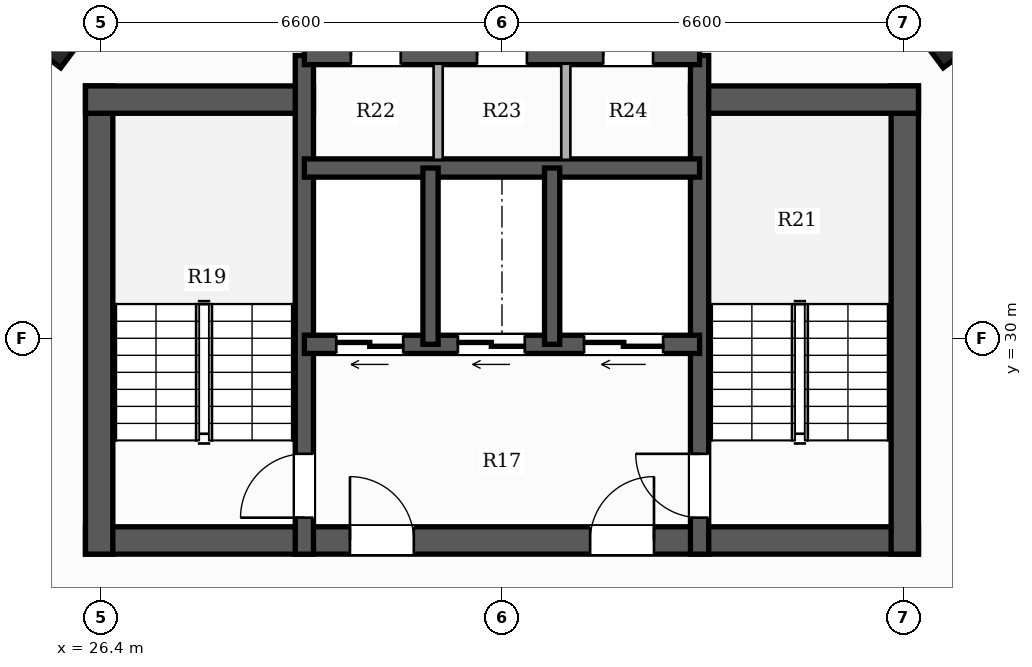
"""IFC4 building model, lengths in metres.
Left out: names, types, materials, properties, quantities, classifications, styles, units other than length and angle.
Written with IfcOpenShell. Run it as: python <this file> out.ifc"""

import sys

from ifc_helpers import new_model, si_unit, direction, frame, frame_2d, origin, origin_2d, place, context, subcontext, project, spatial, rectangle, hollow_rectangle, extrude, element, fill, save


model = new_model("IFC4")
c1 = context("Model", 3, precision=1e-05, world=origin(), true_north=direction((0.0, 1.0)))
c2 = subcontext(c1, "Body", "Model", "MODEL_VIEW")
j1 = project(units=[si_unit("LENGTHUNIT", "METRE"), si_unit("PLANEANGLEUNIT", "RADIAN")], contexts=[c1])
p1 = place(None, origin())
s1 = spatial("IfcSite", under=j1, at=p1, CompositionType="ELEMENT")
p2 = place(p1, origin())
s2 = spatial("IfcBuilding", under=s1, at=p2, CompositionType="ELEMENT")
p3 = place(p2, frame((0.0, 0.0, 67.55)))
s3 = spatial("IfcBuildingStorey", under=s2, at=p3, CompositionType="ELEMENT", Elevation=67.55)
p4 = place(p3, frame((26.15, 26.675, 0.0), z_axis=(0.0, 0.0, 1.0), x_axis=(1.0, 0.0, 0.0)))
e1 = element("IfcWall", 1, at=p4, inside=s3, PredefinedType="SHEAR", context=c2, shape_type="SweptSolid", body=[
    extrude(rectangle(XDim=13.7, YDim=0.45, at=frame_2d((6.85, 0.0))), origin(), (0.0, 0.0, 1.0), 3.3),
])
p5 = place(p4, frame((4.35, 0.0, 0.0)))
e2 = element("IfcOpeningElement", 2, at=p5, cuts=e1, PredefinedType="OPENING", context=c2, shape_type="SweptSolid", body=[
    extrude(rectangle(XDim=1.05, YDim=2.15, at=frame_2d((0.525, 1.075))), frame((0.0, 0.235, 0.0), z_axis=(0.0, -1.0, 0.0), x_axis=(1.0, 0.0, 0.0)), (0.0, 0.0, 1.0), 0.47),
])
p6 = place(p4, frame((8.3, 0.0, 0.0)))
e3 = element("IfcOpeningElement", 3, at=p6, cuts=e1, PredefinedType="OPENING", context=c2, shape_type="SweptSolid", body=[
    extrude(rectangle(XDim=1.05, YDim=2.15, at=frame_2d((0.525, 1.075))), frame((0.0, 0.235, 0.0), z_axis=(0.0, -1.0, 0.0), x_axis=(1.0, 0.0, 0.0)), (0.0, 0.0, 1.0), 0.47),
])
p7 = place(p3, frame((26.375, 26.45, 0.0), z_axis=(0.0, 0.0, 1.0), x_axis=(0.0, 1.0, 0.0)))
e4 = element("IfcWall", 4, at=p7, inside=s3, PredefinedType="SHEAR", context=c2, shape_type="SweptSolid", body=[
    extrude(rectangle(XDim=7.7, YDim=0.45, at=frame_2d((3.85, 0.0))), origin(), (0.0, 0.0, 1.0), 3.3),
])
p8 = place(p3, frame((26.15, 33.925, 0.0), z_axis=(0.0, 0.0, 1.0), x_axis=(1.0, 0.0, 0.0)))
e5 = element("IfcWall", 5, at=p8, inside=s3, PredefinedType="SHEAR", context=c2, shape_type="SweptSolid", body=[
    extrude(rectangle(XDim=3.75, YDim=0.45, at=frame_2d((1.875, 0.0))), origin(), (0.0, 0.0, 1.0), 3.3),
])
p9 = place(p3, frame((39.625, 26.45, 0.0), z_axis=(0.0, 0.0, 1.0), x_axis=(0.0, 1.0, 0.0)))
e6 = element("IfcWall", 6, at=p9, inside=s3, PredefinedType="SHEAR", context=c2, shape_type="SweptSolid", body=[
    extrude(rectangle(XDim=7.7, YDim=0.45, at=frame_2d((3.85, 0.0))), origin(), (0.0, 0.0, 1.0), 3.3),
])
p10 = place(p3, frame((36.1, 33.925, 0.0), z_axis=(0.0, 0.0, 1.0), x_axis=(1.0, 0.0, 0.0)))
e7 = element("IfcWall", 7, at=p10, inside=s3, PredefinedType="SHEAR", context=c2, shape_type="SweptSolid", body=[
    extrude(rectangle(XDim=3.75, YDim=0.45, at=frame_2d((1.875, 0.0))), origin(), (0.0, 0.0, 1.0), 3.3),
])
p11 = place(p3, frame((29.75, 26.45, 0.0), z_axis=(0.0, 0.0, 1.0), x_axis=(0.0, 1.0, 0.0)))
e8 = element("IfcWall", 8, at=p11, inside=s3, PredefinedType="SHEAR", context=c2, shape_type="SweptSolid", body=[
    extrude(rectangle(XDim=8.2, YDim=0.3, at=frame_2d((4.1, 0.0))), origin(), (0.0, 0.0, 1.0), 3.3),
])
p12 = place(p11, frame((0.6, 0.0, 0.0)))
e9 = element("IfcOpeningElement", 9, at=p12, cuts=e8, PredefinedType="OPENING", context=c2, shape_type="SweptSolid", body=[
    extrude(rectangle(XDim=1.05, YDim=2.15, at=frame_2d((0.525, 1.075))), frame((0.0, 0.16, 0.0), z_axis=(0.0, -1.0, 0.0), x_axis=(1.0, 0.0, 0.0)), (0.0, 0.0, 1.0), 0.32),
])
p13 = place(p3, frame((36.25, 26.45, 0.0), z_axis=(0.0, 0.0, 1.0), x_axis=(0.0, 1.0, 0.0)))
e10 = element("IfcWall", 10, at=p13, inside=s3, PredefinedType="SHEAR", context=c2, shape_type="SweptSolid", body=[
    extrude(rectangle(XDim=8.2, YDim=0.3, at=frame_2d((4.1, 0.0))), origin(), (0.0, 0.0, 1.0), 3.3),
])
p14 = place(p13, frame((0.6, 0.0, 0.0)))
e11 = element("IfcOpeningElement", 11, at=p14, cuts=e10, PredefinedType="OPENING", context=c2, shape_type="SweptSolid", body=[
    extrude(rectangle(XDim=1.05, YDim=2.15, at=frame_2d((0.525, 1.075))), frame((0.0, 0.16, 0.0), z_axis=(0.0, -1.0, 0.0), x_axis=(1.0, 0.0, 0.0)), (0.0, 0.0, 1.0), 0.32),
])
p15 = place(p3, frame((36.25, 29.9, 0.0), z_axis=(0.0, 0.0, 1.0), x_axis=(-1.0, 0.0, 0.0)))
e12 = element("IfcWall", 12, at=p15, inside=s3, PredefinedType="SHEAR", context=c2, shape_type="SweptSolid", body=[
    extrude(rectangle(XDim=6.5, YDim=0.3, at=frame_2d((3.25, 0.0))), origin(), (0.0, 0.0, 1.0), 3.3),
])
p16 = place(p15, frame((4.875, 0.0, 0.0)))
e13 = element("IfcOpeningElement", 13, at=p16, cuts=e12, PredefinedType="OPENING", context=c2, shape_type="SweptSolid", body=[
    extrude(rectangle(XDim=1.1, YDim=2.2, at=frame_2d((0.55, 1.1))), frame((0.0, 0.16, 0.0), z_axis=(0.0, -1.0, 0.0), x_axis=(1.0, 0.0, 0.0)), (0.0, 0.0, 1.0), 0.32),
])
p17 = place(p15, frame((2.875, 0.0, 0.0)))
e14 = element("IfcOpeningElement", 14, at=p17, cuts=e12, PredefinedType="OPENING", context=c2, shape_type="SweptSolid", body=[
    extrude(rectangle(XDim=1.1, YDim=2.2, at=frame_2d((0.55, 1.1))), frame((0.0, 0.16, 0.0), z_axis=(0.0, -1.0, 0.0), x_axis=(1.0, 0.0, 0.0)), (0.0, 0.0, 1.0), 0.32),
])
p18 = place(p15, frame((0.6, 0.0, 0.0)))
e15 = element("IfcOpeningElement", 15, at=p18, cuts=e12, PredefinedType="OPENING", context=c2, shape_type="SweptSolid", body=[
    extrude(rectangle(XDim=1.3, YDim=2.2, at=frame_2d((0.65, 1.1))), frame((0.0, 0.16, 0.0), z_axis=(0.0, -1.0, 0.0), x_axis=(1.0, 0.0, 0.0)), (0.0, 0.0, 1.0), 0.32),
])
p19 = place(p3, frame((29.75, 32.8, 0.0), z_axis=(0.0, 0.0, 1.0), x_axis=(1.0, 0.0, 0.0)))
e16 = element("IfcWall", 16, at=p19, inside=s3, PredefinedType="SHEAR", context=c2, shape_type="SweptSolid", body=[
    extrude(rectangle(XDim=6.5, YDim=0.3, at=frame_2d((3.25, 0.0))), origin(), (0.0, 0.0, 1.0), 3.3),
])
for number, where, z_axis, x_axis in (
    (17, (31.825, 29.9, 0.0), (0.0, 0.0, 1.0), (0.0, 1.0, 0.0)),
    (18, (33.825, 29.9, 0.0), (0.0, 0.0, 1.0), (0.0, 1.0, 0.0)),
):
    element("IfcWall", number, at=place(p3, frame(where, z_axis=z_axis, x_axis=x_axis)), inside=s3, PredefinedType="SHEAR", context=c2, shape_type="SweptSolid", body=[
        extrude(rectangle(XDim=2.9, YDim=0.25, at=frame_2d((1.45, 0.0))), origin(), (0.0, 0.0, 1.0), 3.3),
    ])
p20 = place(p3, frame((29.75, 34.65, 0.0), z_axis=(0.0, 0.0, 1.0), x_axis=(1.0, 0.0, 0.0)))
e19 = element("IfcWall", 19, at=p20, inside=s3, PredefinedType="SHEAR", context=c2, shape_type="SweptSolid", body=[
    extrude(rectangle(XDim=6.5, YDim=0.3, at=frame_2d((3.25, 0.0))), origin(), (0.0, 0.0, 1.0), 3.3),
])
p21 = place(p20, frame((0.765, 0.0, 0.0)))
e20 = element("IfcOpeningElement", 20, at=p21, cuts=e19, PredefinedType="OPENING", context=c2, shape_type="SweptSolid", body=[
    extrude(rectangle(XDim=0.82, YDim=2.1, at=frame_2d((0.41, 1.05))), frame((0.0, 0.16, 0.0), z_axis=(0.0, -1.0, 0.0), x_axis=(1.0, 0.0, 0.0)), (0.0, 0.0, 1.0), 0.32),
])
p22 = place(p20, frame((2.84, 0.0, 0.0)))
e21 = element("IfcOpeningElement", 21, at=p22, cuts=e19, PredefinedType="OPENING", context=c2, shape_type="SweptSolid", body=[
    extrude(rectangle(XDim=0.82, YDim=2.1, at=frame_2d((0.41, 1.05))), frame((0.0, 0.16, 0.0), z_axis=(0.0, -1.0, 0.0), x_axis=(1.0, 0.0, 0.0)), (0.0, 0.0, 1.0), 0.32),
])
p23 = place(p20, frame((4.915, 0.0, 0.0)))
e22 = element("IfcOpeningElement", 22, at=p23, cuts=e19, PredefinedType="OPENING", context=c2, shape_type="SweptSolid", body=[
    extrude(rectangle(XDim=0.82, YDim=2.1, at=frame_2d((0.41, 1.05))), frame((0.0, 0.16, 0.0), z_axis=(0.0, -1.0, 0.0), x_axis=(1.0, 0.0, 0.0)), (0.0, 0.0, 1.0), 0.32),
])
for number, where, z_axis, x_axis in (
    (23, (25.648, 35.113, 0.0), (0.0, 0.0, 1.0), (0.6, 0.8, 0.0)),
    (24, (40.352, 35.113, 0.0), (0.0, 0.0, 1.0), (-0.6, 0.8, 0.0)),
):
    element("IfcColumn", number, at=place(p3, frame(where, z_axis=z_axis, x_axis=x_axis)), inside=s3, PredefinedType="COLUMN", context=c2, shape_type="SweptSolid", body=[
        extrude(hollow_rectangle(XDim=0.95, YDim=0.95, WallThickness=0.032, at=origin_2d()), origin(), (0.0, 0.0, 1.0), 3.3),
    ])
for number, where, z_axis, x_axis in (
    (25, (31.95, 32.935, 0.0), (0.0, 0.0, 1.0), (0.0, 1.0, 0.0)),
    (26, (34.05, 32.935, 0.0), (0.0, 0.0, 1.0), (0.0, 1.0, 0.0)),
):
    element("IfcWall", number, at=place(p3, frame(where, z_axis=z_axis, x_axis=x_axis)), inside=s3, PredefinedType="PARTITIONING", context=c2, shape_type="SweptSolid", body=[
        extrude(rectangle(XDim=1.58, YDim=0.15, at=frame_2d((0.79, 0.0))), origin(), (0.0, 0.0, 1.0), 3.06),
    ])
p24 = place(p12, origin())
e27 = element("IfcDoor", 27, at=p24, inside=s3, OperationType="SINGLE_SWING_LEFT", PredefinedType="DOOR", context=c2, shape_type="SweptSolid", body=[
    extrude(rectangle(XDim=1.05, YDim=2.15, at=frame_2d((0.525, 1.075))), frame((0.0, 0.025, 0.0), z_axis=(0.0, -1.0, 0.0), x_axis=(1.0, 0.0, 0.0)), (0.0, 0.0, 1.0), 0.05),
])
fill(e9, e27)
p25 = place(p14, origin())
e28 = element("IfcDoor", 28, at=p25, inside=s3, OperationType="SINGLE_SWING_RIGHT", PredefinedType="DOOR", context=c2, shape_type="SweptSolid", body=[
    extrude(rectangle(XDim=1.05, YDim=2.15, at=frame_2d((0.525, 1.075))), frame((0.0, 0.025, 0.0), z_axis=(0.0, -1.0, 0.0), x_axis=(1.0, 0.0, 0.0)), (0.0, 0.0, 1.0), 0.05),
])
fill(e11, e28)
p26 = place(p5, origin())
e29 = element("IfcDoor", 29, at=p26, inside=s3, OperationType="SINGLE_SWING_LEFT", PredefinedType="DOOR", context=c2, shape_type="SweptSolid", body=[
    extrude(rectangle(XDim=1.05, YDim=2.15, at=frame_2d((0.525, 1.075))), frame((0.0, 0.025, 0.0), z_axis=(0.0, -1.0, 0.0), x_axis=(1.0, 0.0, 0.0)), (0.0, 0.0, 1.0), 0.05),
])
fill(e2, e29)
p27 = place(p6, origin())
e30 = element("IfcDoor", 30, at=p27, inside=s3, OperationType="SINGLE_SWING_RIGHT", PredefinedType="DOOR", context=c2, shape_type="SweptSolid", body=[
    extrude(rectangle(XDim=1.05, YDim=2.15, at=frame_2d((0.525, 1.075))), frame((0.0, 0.025, 0.0), z_axis=(0.0, -1.0, 0.0), x_axis=(1.0, 0.0, 0.0)), (0.0, 0.0, 1.0), 0.05),
])
fill(e3, e30)
p28 = place(p16, origin())
e31 = element("IfcDoor", 31, at=p28, inside=s3, OperationType="DOUBLE_DOOR_SLIDING", PredefinedType="DOOR", context=c2, shape_type="SweptSolid", body=[
    extrude(rectangle(XDim=1.1, YDim=2.2, at=frame_2d((0.55, 1.1))), frame((0.0, 0.025, 0.0), z_axis=(0.0, -1.0, 0.0), x_axis=(1.0, 0.0, 0.0)), (0.0, 0.0, 1.0), 0.05),
])
fill(e13, e31)
p29 = place(p17, origin())
e32 = element("IfcDoor", 32, at=p29, inside=s3, OperationType="DOUBLE_DOOR_SLIDING", PredefinedType="DOOR", context=c2, shape_type="SweptSolid", body=[
    extrude(rectangle(XDim=1.1, YDim=2.2, at=frame_2d((0.55, 1.1))), frame((0.0, 0.025, 0.0), z_axis=(0.0, -1.0, 0.0), x_axis=(1.0, 0.0, 0.0)), (0.0, 0.0, 1.0), 0.05),
])
fill(e14, e32)
p30 = place(p18, origin())
e33 = element("IfcDoor", 33, at=p30, inside=s3, OperationType="DOUBLE_DOOR_SLIDING", PredefinedType="DOOR", context=c2, shape_type="SweptSolid", body=[
    extrude(rectangle(XDim=1.3, YDim=2.2, at=frame_2d((0.65, 1.1))), frame((0.0, 0.025, 0.0), z_axis=(0.0, -1.0, 0.0), x_axis=(1.0, 0.0, 0.0)), (0.0, 0.0, 1.0), 0.05),
])
fill(e15, e33)
p31 = place(p21, origin())
e34 = element("IfcDoor", 34, at=p31, inside=s3, OperationType="SINGLE_SWING_LEFT", PredefinedType="DOOR", context=c2, shape_type="SweptSolid", body=[
    extrude(rectangle(XDim=0.82, YDim=2.1, at=frame_2d((0.41, 1.05))), frame((0.0, 0.025, 0.0), z_axis=(0.0, -1.0, 0.0), x_axis=(1.0, 0.0, 0.0)), (0.0, 0.0, 1.0), 0.05),
])
fill(e20, e34)
p32 = place(p22, origin())
e35 = element("IfcDoor", 35, at=p32, inside=s3, OperationType="SINGLE_SWING_LEFT", PredefinedType="DOOR", context=c2, shape_type="SweptSolid", body=[
    extrude(rectangle(XDim=0.82, YDim=2.1, at=frame_2d((0.41, 1.05))), frame((0.0, 0.025, 0.0), z_axis=(0.0, -1.0, 0.0), x_axis=(1.0, 0.0, 0.0)), (0.0, 0.0, 1.0), 0.05),
])
fill(e21, e35)
p33 = place(p23, origin())
e36 = element("IfcDoor", 36, at=p33, inside=s3, OperationType="SINGLE_SWING_LEFT", PredefinedType="DOOR", context=c2, shape_type="SweptSolid", body=[
    extrude(rectangle(XDim=0.82, YDim=2.1, at=frame_2d((0.41, 1.05))), frame((0.0, 0.025, 0.0), z_axis=(0.0, -1.0, 0.0), x_axis=(1.0, 0.0, 0.0)), (0.0, 0.0, 1.0), 0.05),
])
fill(e22, e36)
save(model, sys.argv[1])
